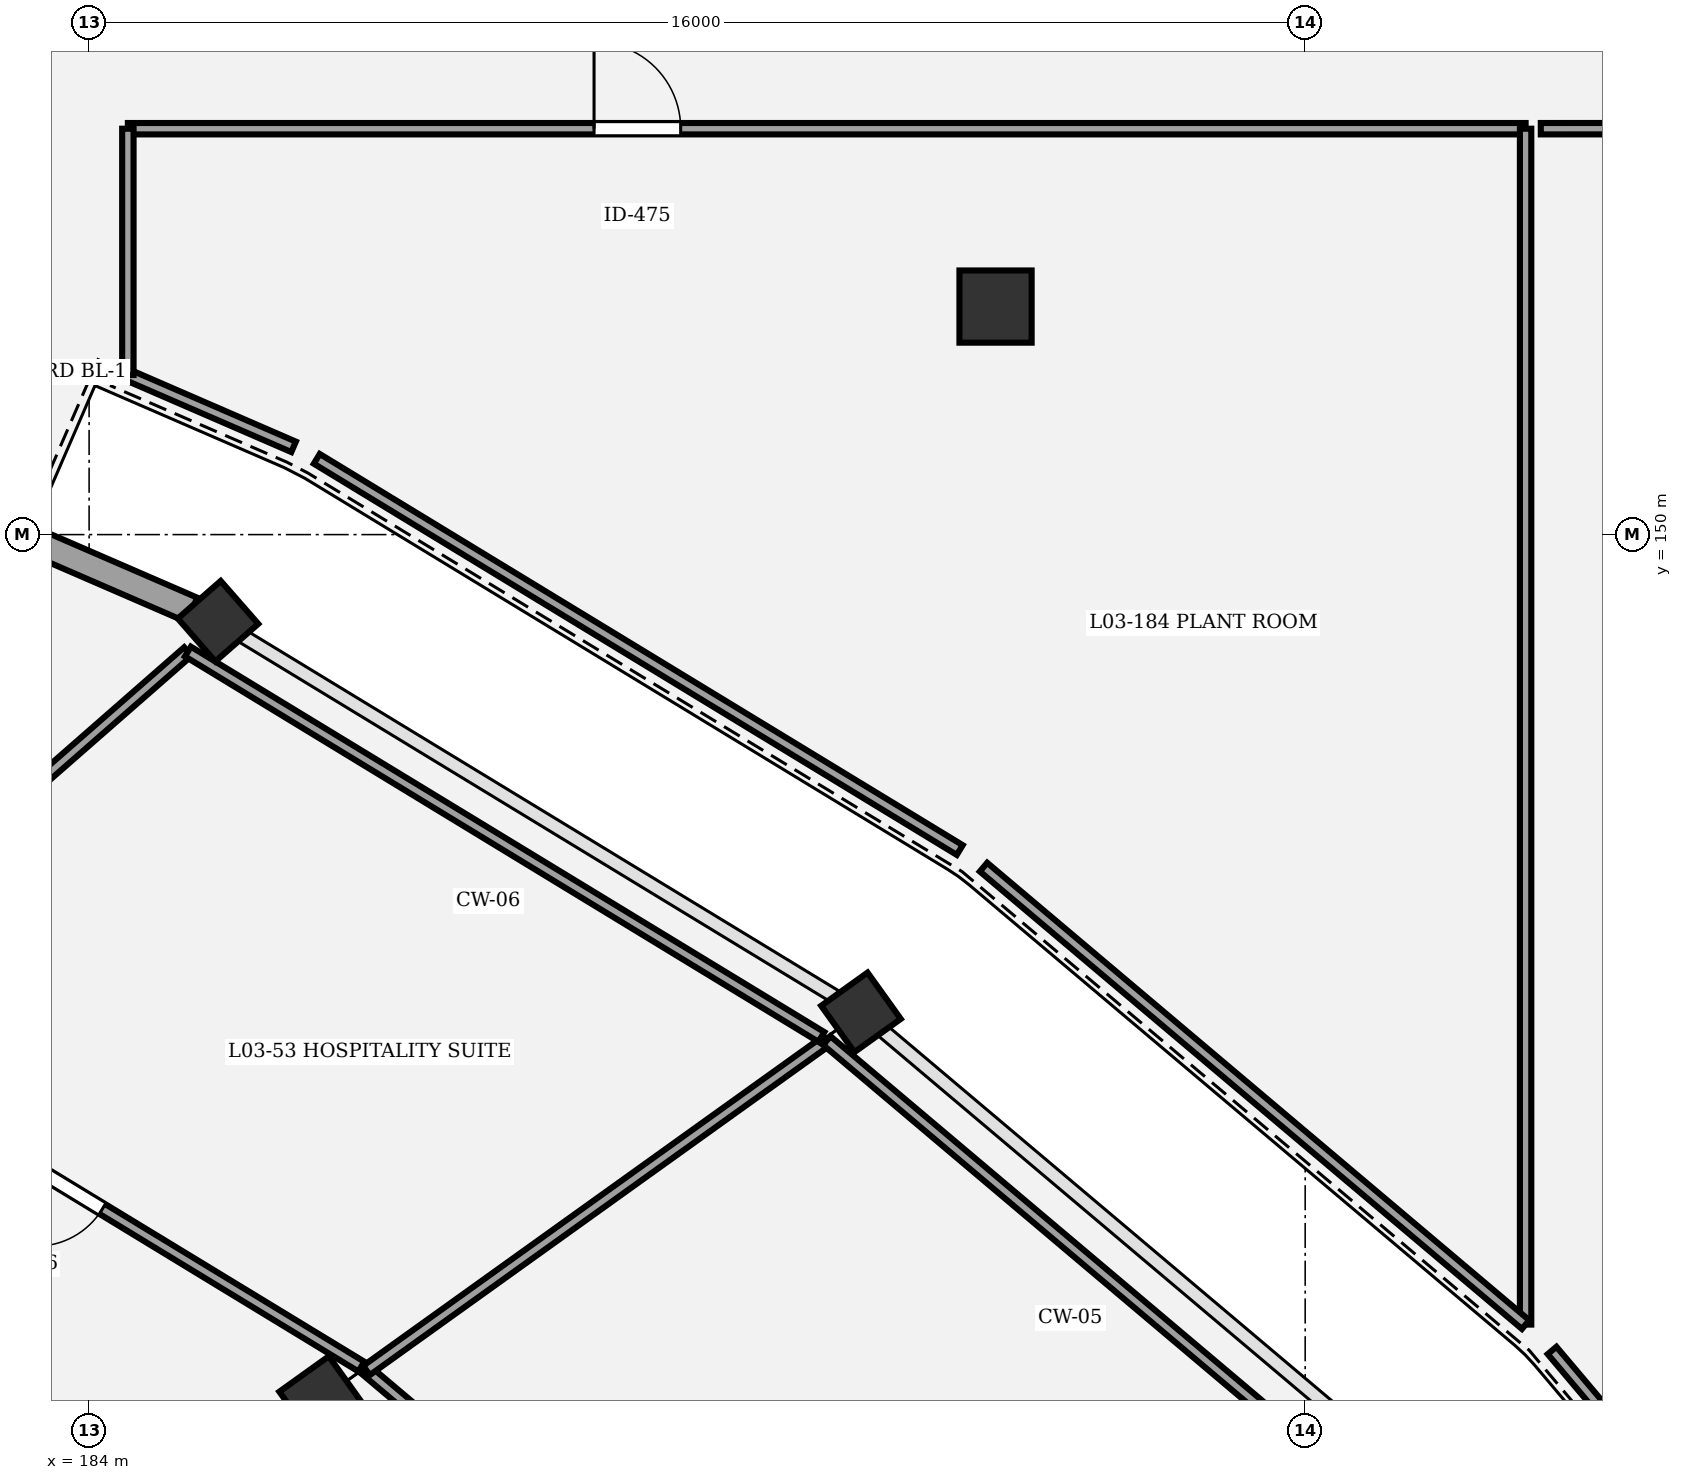
"""IFC4 building model, lengths in metres.
Left out: names, types, materials, properties, quantities, classifications, styles, units other than length and angle.
Written with IfcOpenShell. Run it as: python <this file> out.ifc"""

import sys

from ifc_helpers import new_model, si_unit, direction, frame, frame_2d, origin, origin_2d, place, context, subcontext, project, spatial, rectangle, circle, extrude, element, fill, save


model = new_model("IFC4")
c1 = context("Model", 3, precision=1e-05, world=origin(), true_north=direction((0.0, 1.0)))
c2 = subcontext(c1, "Body", "Model", "MODEL_VIEW")
j1 = project(units=[si_unit("LENGTHUNIT", "METRE"), si_unit("PLANEANGLEUNIT", "RADIAN")], contexts=[c1])
p1 = place(None, origin())
s1 = spatial("IfcSite", under=j1, at=p1, CompositionType="ELEMENT")
p2 = place(p1, origin())
s2 = spatial("IfcBuilding", under=s1, at=p2, CompositionType="ELEMENT")
p3 = place(p2, frame((0.0, 0.0, 14.7)))
s3 = spatial("IfcBuildingStorey", under=s2, at=p3, CompositionType="ELEMENT", Elevation=14.7)
p4 = place(p3, frame((187.061, 138.632, 0.0), z_axis=(0.0, 0.0, 1.0), x_axis=(0.812897512265, 0.582406760395, 0.0)))
e1 = element("IfcColumn", 1, at=p4, inside=s3, PredefinedType="COLUMN", context=c2, shape_type="SweptSolid", body=[
    extrude(rectangle(XDim=0.8, YDim=0.8, at=origin_2d()), origin(), (0.0, 0.0, 1.0), 4.5),
])
for number, where, z_axis, x_axis in (
    (2, (194.156, 143.715, 0.0), (0.0, 0.0, 1.0), (0.813, 0.582, 0.0)),
    (3, (185.696, 148.861, 0.0), (0.0, 0.0, 1.0), (0.753, 0.659, 0.0)),
):
    element("IfcColumn", number, at=place(p3, frame(where, z_axis=z_axis, x_axis=x_axis)), inside=s3, PredefinedType="COLUMN", context=c2, shape_type="SweptSolid", body=[
        extrude(rectangle(XDim=0.75, YDim=0.75, at=origin_2d()), origin(), (0.0, 0.0, 1.0), 4.5),
    ])
p5 = place(p3, frame((195.926, 153.0, 0.0), z_axis=(0.0, 0.0, 1.0), x_axis=(1.0, 0.0, 0.0)))
e4 = element("IfcColumn", 4, at=p5, inside=s3, PredefinedType="COLUMN", context=c2, shape_type="SweptSolid", body=[
    extrude(circle(Radius=0.475, at=origin_2d()), origin(), (0.0, 0.0, 1.0), 4.5),
])
p6 = place(p3, frame((176.28, 152.943, 0.0), z_axis=(0.0, 0.0, 1.0), x_axis=(0.917502782842, -0.397729359587, 0.0)))
e5 = element("IfcWall", 5, at=p6, inside=s3, PredefinedType="STANDARD", context=c2, shape_type="SweptSolid", body=[
    extrude(rectangle(XDim=9.89, YDim=0.35, at=frame_2d((4.945, 0.0))), origin(), (0.0, 0.0, 1.0), 3.42),
])
p7 = place(p6, frame((4.045, 0.0, 0.0)))
e6 = element("IfcOpeningElement", 6, at=p7, cuts=e5, PredefinedType="OPENING", context=c2, shape_type="SweptSolid", body=[
    extrude(rectangle(XDim=1.8, YDim=2.4, at=frame_2d((0.9, 1.2))), frame((0.0, 0.185, 0.0), z_axis=(0.0, -1.0, 0.0), x_axis=(1.0, 0.0, 0.0)), (0.0, 0.0, 1.0), 0.37),
])
p8 = place(p3, frame((194.175, 133.497, 0.0), z_axis=(0.0, 0.0, 1.0), x_axis=(-0.764257572309, 0.644911128117, 0.0)))
e7 = element("IfcWall", 7, at=p8, inside=s3, PredefinedType="PARTITIONING", context=c2, shape_type="SweptSolid", body=[
    extrude(rectangle(XDim=8.539, YDim=0.15, at=frame_2d((4.269, 0.0))), origin(), (0.0, 0.0, 1.0), 3.25),
])
p9 = place(p8, frame((3.799, 0.0, 0.0)))
e8 = element("IfcOpeningElement", 8, at=p9, cuts=e7, PredefinedType="OPENING", context=c2, shape_type="SweptSolid", body=[
    extrude(rectangle(XDim=0.94, YDim=2.1, at=frame_2d((0.47, 1.05))), frame((0.0, 0.085, 0.0), z_axis=(0.0, -1.0, 0.0), x_axis=(1.0, 0.0, 0.0)), (0.0, 0.0, 1.0), 0.17),
])
p10 = place(p3, frame((187.582, 139.054, 0.0), z_axis=(0.0, 0.0, 1.0), x_axis=(-0.854321649351, 0.519744667554, 0.0)))
e9 = element("IfcWall", 9, at=p10, inside=s3, PredefinedType="PARTITIONING", context=c2, shape_type="SweptSolid", body=[
    extrude(rectangle(XDim=8.999, YDim=0.15, at=frame_2d((4.499, 0.0))), origin(), (0.0, 0.0, 1.0), 3.25),
])
p11 = place(p10, frame((3.989, 0.0, 0.0)))
e10 = element("IfcOpeningElement", 10, at=p11, cuts=e9, PredefinedType="OPENING", context=c2, shape_type="SweptSolid", body=[
    extrude(rectangle(XDim=1.02, YDim=2.1, at=frame_2d((0.51, 1.05))), frame((0.0, 0.085, 0.0), z_axis=(0.0, -1.0, 0.0), x_axis=(1.0, 0.0, 0.0)), (0.0, 0.0, 1.0), 0.17),
])
p12 = place(p3, frame((184.51, 155.34, 0.0), z_axis=(0.0, 0.0, 1.0), x_axis=(1.0, 0.0, 0.0)))
e11 = element("IfcWall", 11, at=p12, inside=s3, PredefinedType="PARTITIONING", context=c2, shape_type="SweptSolid", body=[
    extrude(rectangle(XDim=18.39, YDim=0.15, at=frame_2d((9.195, 0.0))), origin(), (0.0, 0.0, 1.0), 3.25),
])
p13 = place(p12, frame((6.134, 0.0, 0.0)))
e12 = element("IfcOpeningElement", 12, at=p13, cuts=e11, PredefinedType="OPENING", context=c2, shape_type="SweptSolid", body=[
    extrude(rectangle(XDim=1.14, YDim=2.1, at=frame_2d((0.57, 1.05))), frame((0.0, 0.085, 0.0), z_axis=(0.0, -1.0, 0.0), x_axis=(1.0, 0.0, 0.0)), (0.0, 0.0, 1.0), 0.17),
])
p14 = place(p3, frame((187.649, 139.004, 0.0), z_axis=(0.0, 0.0, 1.0), x_axis=(0.812884613266, 0.582424763824, 0.0)))
e13 = element("IfcWall", 13, at=p14, inside=s3, PredefinedType="PARTITIONING", context=c2, shape_type="SweptSolid", body=[
    extrude(rectangle(XDim=7.45, YDim=0.15, at=frame_2d((3.725, 0.0))), origin(), (0.0, 0.0, 1.0), 3.25),
])
p15 = place(p3, frame((193.706, 143.343, 0.0), z_axis=(0.0, 0.0, 1.0), x_axis=(0.764252893528, -0.644916672706, 0.0)))
e14 = element("IfcWall", 14, at=p15, inside=s3, PredefinedType="PARTITIONING", context=c2, shape_type="SweptSolid", body=[
    extrude(rectangle(XDim=9.257, YDim=0.15, at=frame_2d((4.629, 0.0))), origin(), (0.0, 0.0, 1.0), 3.25),
])
p16 = place(p3, frame((179.895, 143.731, 0.0), z_axis=(0.0, 0.0, 1.0), x_axis=(0.752564061831, 0.658519045162, 0.0)))
e15 = element("IfcWall", 15, at=p16, inside=s3, PredefinedType="PARTITIONING", context=c2, shape_type="SweptSolid", body=[
    extrude(rectangle(XDim=7.183, YDim=0.15, at=frame_2d((3.592, 0.0))), origin(), (0.0, 0.0, 1.0), 3.25),
])
p17 = place(p3, frame((185.3, 148.461, 0.0), z_axis=(0.0, 0.0, 1.0), x_axis=(0.854323689683, -0.519741313777, 0.0)))
e16 = element("IfcWall", 16, at=p17, inside=s3, PredefinedType="PARTITIONING", context=c2, shape_type="SweptSolid", body=[
    extrude(rectangle(XDim=9.756, YDim=0.15, at=frame_2d((4.878, 0.0))), origin(), (0.0, 0.0, 1.0), 3.25),
])
p18 = place(p3, frame((195.455, 145.85, 0.0), z_axis=(0.0, 0.0, 1.0), x_axis=(-0.854333268174, 0.519725568826, 0.0)))
e17 = element("IfcWall", 17, at=p18, inside=s3, PredefinedType="PARTITIONING", context=c2, shape_type="SweptSolid", body=[
    extrude(rectangle(XDim=9.902, YDim=0.15, at=frame_2d((4.951, 0.0))), origin(), (0.0, 0.0, 1.0), 3.25),
])
p19 = place(p3, frame((186.69, 151.155, 0.0), z_axis=(0.0, 0.0, 1.0), x_axis=(-0.917484400903, 0.397771761314, 0.0)))
e18 = element("IfcWall", 18, at=p19, inside=s3, PredefinedType="PARTITIONING", context=c2, shape_type="SweptSolid", body=[
    extrude(rectangle(XDim=2.376, YDim=0.15, at=frame_2d((1.188, 0.0))), origin(), (0.0, 0.0, 1.0), 3.25),
])
p20 = place(p3, frame((184.51, 152.1, 0.0), z_axis=(0.0, 0.0, 1.0), x_axis=(0.0, 1.0, 0.0)))
e19 = element("IfcWall", 19, at=p20, inside=s3, PredefinedType="PARTITIONING", context=c2, shape_type="SweptSolid", body=[
    extrude(rectangle(XDim=3.24, YDim=0.15, at=frame_2d((1.62, 0.0))), origin(), (0.0, 0.0, 1.0), 3.25),
])
p21 = place(p3, frame((202.9, 155.34, 0.0), z_axis=(0.0, 0.0, 1.0), x_axis=(0.0, -1.0, 0.0)))
e20 = element("IfcWall", 20, at=p21, inside=s3, PredefinedType="PARTITIONING", context=c2, shape_type="SweptSolid", body=[
    extrude(rectangle(XDim=15.733, YDim=0.15, at=frame_2d((7.867, 0.0))), origin(), (0.0, 0.0, 1.0), 3.25),
])
p22 = place(p3, frame((202.9, 139.607, 0.0), z_axis=(0.0, 0.0, 1.0), x_axis=(-0.764245949545, 0.644924901523, 0.0)))
e21 = element("IfcWall", 21, at=p22, inside=s3, PredefinedType="PARTITIONING", context=c2, shape_type="SweptSolid", body=[
    extrude(rectangle(XDim=9.332, YDim=0.15, at=frame_2d((4.666, 0.0))), origin(), (0.0, 0.0, 1.0), 3.25),
])
p23 = place(p3, frame((209.153, 132.274, 0.0), z_axis=(0.0, 0.0, 1.0), x_axis=(-0.645180125691, 0.764030500316, 0.0)))
e22 = element("IfcWall", 22, at=p23, inside=s3, PredefinedType="PARTITIONING", context=c2, shape_type="SweptSolid", body=[
    extrude(rectangle(XDim=9.151, YDim=0.15, at=frame_2d((4.576, 0.0))), origin(), (0.0, 0.0, 1.0), 3.25),
])
p24 = place(p3, frame((203.1, 155.34, 0.0), z_axis=(0.0, 0.0, 1.0), x_axis=(0.99999997621, 0.00021812629, 0.0)))
e23 = element("IfcWall", 23, at=p24, inside=s3, PredefinedType="PARTITIONING", context=c2, shape_type="SweptSolid", body=[
    extrude(rectangle(XDim=13.431, YDim=0.15, at=frame_2d((6.716, 0.0))), origin(), (0.0, 0.0, 1.0), 3.25),
])
p25 = place(p11, origin())
e24 = element("IfcDoor", 24, at=p25, inside=s3, OperationType="SINGLE_SWING_RIGHT", PredefinedType="DOOR", context=c2, shape_type="SweptSolid", body=[
    extrude(rectangle(XDim=1.02, YDim=2.1, at=frame_2d((0.51, 1.05))), frame((0.0, 0.025, 0.0), z_axis=(0.0, -1.0, 0.0), x_axis=(1.0, 0.0, 0.0)), (0.0, 0.0, 1.0), 0.05),
])
fill(e10, e24)
p26 = place(p13, origin())
e25 = element("IfcDoor", 25, at=p26, inside=s3, OperationType="SINGLE_SWING_LEFT", PredefinedType="DOOR", context=c2, shape_type="SweptSolid", body=[
    extrude(rectangle(XDim=1.14, YDim=2.1, at=frame_2d((0.57, 1.05))), frame((0.0, 0.025, 0.0), z_axis=(0.0, -1.0, 0.0), x_axis=(1.0, 0.0, 0.0)), (0.0, 0.0, 1.0), 0.05),
])
fill(e12, e25)
save(model, sys.argv[1])
